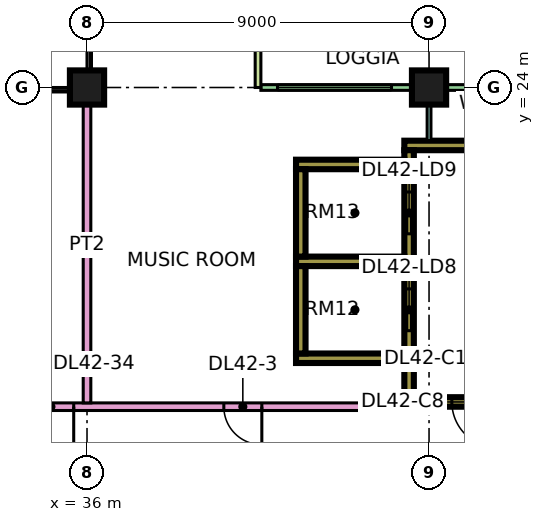
"""IFC4 building model, lengths in metres.
Left out: names, types, materials, properties, quantities, classifications, styles, units other than length and angle.
Written with IfcOpenShell. Run it as: python <this file> out.ifc"""

import sys

from ifc_helpers import new_model, si_unit, direction, frame, frame_2d, origin, origin_2d, place, context, subcontext, project, spatial, rectangle, extrude, element, fill, save


model = new_model("IFC4")
c1 = context("Model", 3, precision=1e-05, world=origin(), true_north=direction((0.0, 1.0)))
c2 = subcontext(c1, "Body", "Model", "MODEL_VIEW")
j1 = project(units=[si_unit("LENGTHUNIT", "METRE"), si_unit("PLANEANGLEUNIT", "RADIAN")], contexts=[c1])
p1 = place(None, origin())
s1 = spatial("IfcSite", under=j1, at=p1, CompositionType="ELEMENT")
p2 = place(p1, origin())
s2 = spatial("IfcBuilding", under=s1, at=p2, CompositionType="ELEMENT")
p3 = place(p2, frame((0.0, 0.0, 183.65)))
s3 = spatial("IfcBuildingStorey", under=s2, at=p3, CompositionType="ELEMENT", Elevation=183.65)
for number, where, z_axis, x_axis in (
    (1, (36.0, 24.0, 0.0), (0.0, 0.0, 1.0), (1.0, 0.0, 0.0)),
    (2, (45.0, 24.0, 0.0), (0.0, 0.0, 1.0), (1.0, 0.0, 0.0)),
):
    element("IfcColumn", number, at=place(p3, frame(where, z_axis=z_axis, x_axis=x_axis)), inside=s3, PredefinedType="COLUMN", context=c2, shape_type="SweptSolid", body=[
        extrude(rectangle(XDim=0.9, YDim=0.9, at=origin_2d()), origin(), (0.0, 0.0, 1.0), 3.75),
    ])
p4 = place(p3, frame((44.35, 15.725, 0.0), z_axis=(0.0, 0.0, 1.0), x_axis=(1.0, 0.0, 0.0)))
e3 = element("IfcWall", 3, at=p4, inside=s3, PredefinedType="SHEAR", context=c2, shape_type="SweptSolid", body=[
    extrude(rectangle(XDim=3.425, YDim=0.25, at=frame_2d((1.712, 0.0))), origin(), (0.0, 0.0, 1.0), 3.75),
])
p5 = place(p4, frame((1.25, 0.0, 0.0)))
e4 = element("IfcOpeningElement", 4, at=p5, cuts=e3, PredefinedType="OPENING", context=c2, shape_type="SweptSolid", body=[
    extrude(rectangle(XDim=1.2, YDim=2.2, at=frame_2d((0.6, 1.1))), frame((0.0, 0.135, 0.0), z_axis=(0.0, -1.0, 0.0), x_axis=(1.0, 0.0, 0.0)), (0.0, 0.0, 1.0), 0.27),
])
p6 = place(p3, frame((44.35, 22.475, 0.0), z_axis=(0.0, 0.0, 1.0), x_axis=(1.0, 0.0, 0.0)))
e5 = element("IfcWall", 5, at=p6, inside=s3, PredefinedType="SHEAR", context=c2, shape_type="SweptSolid", body=[
    extrude(rectangle(XDim=3.425, YDim=0.25, at=frame_2d((1.712, 0.0))), origin(), (0.0, 0.0, 1.0), 3.75),
])
p7 = place(p3, frame((44.475, 15.85, 0.0), z_axis=(0.0, 0.0, 1.0), x_axis=(0.0, 1.0, 0.0)))
e6 = element("IfcWall", 6, at=p7, inside=s3, PredefinedType="SHEAR", context=c2, shape_type="SweptSolid", body=[
    extrude(rectangle(XDim=6.5, YDim=0.25, at=frame_2d((3.25, 0.0))), origin(), (0.0, 0.0, 1.0), 3.75),
])
p8 = place(p7, frame((1.75, 0.0, 0.0)))
e7 = element("IfcOpeningElement", 7, at=p8, cuts=e6, PredefinedType="OPENING", context=c2, shape_type="SweptSolid", body=[
    extrude(rectangle(XDim=1.1, YDim=2.2, at=frame_2d((0.55, 1.1))), frame((0.0, 0.135, 0.0), z_axis=(0.0, -1.0, 0.0), x_axis=(1.0, 0.0, 0.0)), (0.0, 0.0, 1.0), 0.27),
])
p9 = place(p7, frame((4.3, 0.0, 0.0)))
e8 = element("IfcOpeningElement", 8, at=p9, cuts=e6, PredefinedType="OPENING", context=c2, shape_type="SweptSolid", body=[
    extrude(rectangle(XDim=1.1, YDim=2.2, at=frame_2d((0.55, 1.1))), frame((0.0, 0.135, 0.0), z_axis=(0.0, -1.0, 0.0), x_axis=(1.0, 0.0, 0.0)), (0.0, 0.0, 1.0), 0.27),
])
for number, where, z_axis, x_axis in (
    (9, (41.5, 16.875, 0.0), (0.0, 0.0, 1.0), (1.0, 0.0, 0.0)),
    (10, (41.5, 19.425, 0.0), (0.0, 0.0, 1.0), (1.0, 0.0, 0.0)),
    (11, (41.5, 21.975, 0.0), (0.0, 0.0, 1.0), (1.0, 0.0, 0.0)),
):
    element("IfcWall", number, at=place(p3, frame(where, z_axis=z_axis, x_axis=x_axis)), inside=s3, PredefinedType="SHEAR", context=c2, shape_type="SweptSolid", body=[
        extrude(rectangle(XDim=2.85, YDim=0.25, at=frame_2d((1.425, 0.0))), origin(), (0.0, 0.0, 1.0), 3.75),
    ])
for number, where, z_axis, x_axis in (
    (12, (41.625, 17.0, 0.0), (0.0, 0.0, 1.0), (0.0, 1.0, 0.0)),
    (13, (41.625, 19.55, 0.0), (0.0, 0.0, 1.0), (0.0, 1.0, 0.0)),
):
    element("IfcWall", number, at=place(p3, frame(where, z_axis=z_axis, x_axis=x_axis)), inside=s3, PredefinedType="SHEAR", context=c2, shape_type="SweptSolid", body=[
        extrude(rectangle(XDim=2.3, YDim=0.25, at=frame_2d((1.15, 0.0))), origin(), (0.0, 0.0, 1.0), 3.75),
    ])
p10 = place(p3, frame((47.925, 24.0, 0.0), z_axis=(0.0, 0.0, 1.0), x_axis=(-1.0, 0.0, 0.0)))
e14 = element("IfcWall", 14, at=p10, inside=s3, PredefinedType="SOLIDWALL", context=c2, shape_type="SweptSolid", body=[
    extrude(rectangle(XDim=7.35, YDim=0.15, at=frame_2d((3.675, 0.0))), origin(), (0.0, 0.0, 1.0), 3.35),
])
p11 = place(p10, frame((0.587, 0.0, 0.45)))
e15 = element("IfcOpeningElement", 15, at=p11, cuts=e14, PredefinedType="OPENING", context=c2, shape_type="SweptSolid", body=[
    extrude(rectangle(XDim=1.2, YDim=2.4, at=frame_2d((0.6, 1.2))), frame((0.0, 0.085, 0.0), z_axis=(0.0, -1.0, 0.0), x_axis=(1.0, 0.0, 0.0)), (0.0, 0.0, 1.0), 0.17),
])
p12 = place(p10, frame((3.913, 0.0, 0.45)))
e16 = element("IfcOpeningElement", 16, at=p12, cuts=e14, PredefinedType="OPENING", context=c2, shape_type="SweptSolid", body=[
    extrude(rectangle(XDim=3.0, YDim=2.4, at=frame_2d((1.5, 1.2))), frame((0.0, 0.085, 0.0), z_axis=(0.0, -1.0, 0.0), x_axis=(1.0, 0.0, 0.0)), (0.0, 0.0, 1.0), 0.17),
])
p13 = place(p3, frame((40.5, 25.5, 0.0), z_axis=(0.0, 0.0, 1.0), x_axis=(0.0, -1.0, 0.0)))
e17 = element("IfcWall", 17, at=p13, inside=s3, PredefinedType="SOLIDWALL", context=c2, shape_type="SweptSolid", body=[
    extrude(rectangle(XDim=1.5, YDim=0.15, at=frame_2d((0.75, 0.0))), origin(), (0.0, 0.0, 1.0), 3.35),
])
p14 = place(p3, frame((34.0, 15.6, 0.0), z_axis=(0.0, 0.0, 1.0), x_axis=(1.0, 0.0, 0.0)))
e18 = element("IfcWall", 18, at=p14, inside=s3, PredefinedType="PARTITIONING", context=c2, shape_type="SweptSolid", body=[
    extrude(rectangle(XDim=10.35, YDim=0.2, at=frame_2d((5.175, 0.0))), origin(), (0.0, 0.0, 1.0), 3.35),
])
p15 = place(p14, frame((5.6, 0.0, 0.0)))
e19 = element("IfcOpeningElement", 19, at=p15, cuts=e18, PredefinedType="OPENING", context=c2, shape_type="SweptSolid", body=[
    extrude(rectangle(XDim=1.0, YDim=2.1, at=frame_2d((0.5, 1.05))), frame((0.0, 0.11, 0.0), z_axis=(0.0, -1.0, 0.0), x_axis=(1.0, 0.0, 0.0)), (0.0, 0.0, 1.0), 0.22),
])
p16 = place(p14, frame((0.45, 0.0, 0.0)))
e20 = element("IfcOpeningElement", 20, at=p16, cuts=e18, PredefinedType="OPENING", context=c2, shape_type="SweptSolid", body=[
    extrude(rectangle(XDim=1.2, YDim=2.1, at=frame_2d((0.6, 1.05))), frame((0.0, 0.11, 0.0), z_axis=(0.0, -1.0, 0.0), x_axis=(1.0, 0.0, 0.0)), (0.0, 0.0, 1.0), 0.22),
])
p17 = place(p3, frame((36.0, 15.7, 0.0), z_axis=(0.0, 0.0, 1.0), x_axis=(0.0, 1.0, 0.0)))
e21 = element("IfcWall", 21, at=p17, inside=s3, PredefinedType="PARTITIONING", context=c2, shape_type="SweptSolid", body=[
    extrude(rectangle(XDim=8.3, YDim=0.2, at=frame_2d((4.15, 0.0))), origin(), (0.0, 0.0, 1.0), 3.35),
])
p18 = place(p3, frame((45.0, 22.6, 0.0), z_axis=(0.0, 0.0, 1.0), x_axis=(0.0, 1.0, 0.0)))
e22 = element("IfcWall", 22, at=p18, inside=s3, PredefinedType="PARTITIONING", context=c2, shape_type="SweptSolid", body=[
    extrude(rectangle(XDim=1.326, YDim=0.1, at=frame_2d((0.663, 0.0))), origin(), (0.0, 0.0, 1.0), 3.35),
])
p19 = place(p12, origin())
e23 = element("IfcWindow", 23, at=p19, inside=s3, PartitioningType="SINGLE_PANEL", PredefinedType="WINDOW", context=c2, shape_type="SweptSolid", body=[
    extrude(rectangle(XDim=3.0, YDim=2.4, at=frame_2d((1.5, 1.2))), frame((0.0, 0.03, 0.0), z_axis=(0.0, -1.0, 0.0), x_axis=(1.0, 0.0, 0.0)), (0.0, 0.0, 1.0), 0.06),
])
fill(e16, e23)
p20 = place(p5, origin())
e24 = element("IfcDoor", 24, at=p20, inside=s3, OperationType="SINGLE_SWING_RIGHT", PredefinedType="DOOR", context=c2, shape_type="SweptSolid", body=[
    extrude(rectangle(XDim=1.2, YDim=2.2, at=frame_2d((0.6, 1.1))), frame((0.0, 0.025, 0.0), z_axis=(0.0, -1.0, 0.0), x_axis=(1.0, 0.0, 0.0)), (0.0, 0.0, 1.0), 0.05),
])
fill(e4, e24)
p21 = place(p8, origin())
e25 = element("IfcDoor", 25, at=p21, inside=s3, OperationType="DOUBLE_DOOR_SLIDING", PredefinedType="DOOR", context=c2, shape_type="SweptSolid", body=[
    extrude(rectangle(XDim=1.1, YDim=2.2, at=frame_2d((0.55, 1.1))), frame((0.0, 0.025, 0.0), z_axis=(0.0, -1.0, 0.0), x_axis=(1.0, 0.0, 0.0)), (0.0, 0.0, 1.0), 0.05),
])
fill(e7, e25)
p22 = place(p9, origin())
e26 = element("IfcDoor", 26, at=p22, inside=s3, OperationType="DOUBLE_DOOR_SLIDING", PredefinedType="DOOR", context=c2, shape_type="SweptSolid", body=[
    extrude(rectangle(XDim=1.1, YDim=2.2, at=frame_2d((0.55, 1.1))), frame((0.0, 0.025, 0.0), z_axis=(0.0, -1.0, 0.0), x_axis=(1.0, 0.0, 0.0)), (0.0, 0.0, 1.0), 0.05),
])
fill(e8, e26)
p23 = place(p15, origin())
e27 = element("IfcDoor", 27, at=p23, inside=s3, OperationType="SINGLE_SWING_RIGHT", PredefinedType="DOOR", context=c2, shape_type="SweptSolid", body=[
    extrude(rectangle(XDim=1.0, YDim=2.1, at=frame_2d((0.5, 1.05))), frame((0.0, 0.025, 0.0), z_axis=(0.0, -1.0, 0.0), x_axis=(1.0, 0.0, 0.0)), (0.0, 0.0, 1.0), 0.05),
])
fill(e19, e27)
p24 = place(p16, origin())
e28 = element("IfcDoor", 28, at=p24, inside=s3, OperationType="SINGLE_SWING_RIGHT", PredefinedType="DOOR", context=c2, shape_type="SweptSolid", body=[
    extrude(rectangle(XDim=1.2, YDim=2.1, at=frame_2d((0.6, 1.05))), frame((0.0, 0.025, 0.0), z_axis=(0.0, -1.0, 0.0), x_axis=(1.0, 0.0, 0.0)), (0.0, 0.0, 1.0), 0.05),
])
fill(e20, e28)
save(model, sys.argv[1])
